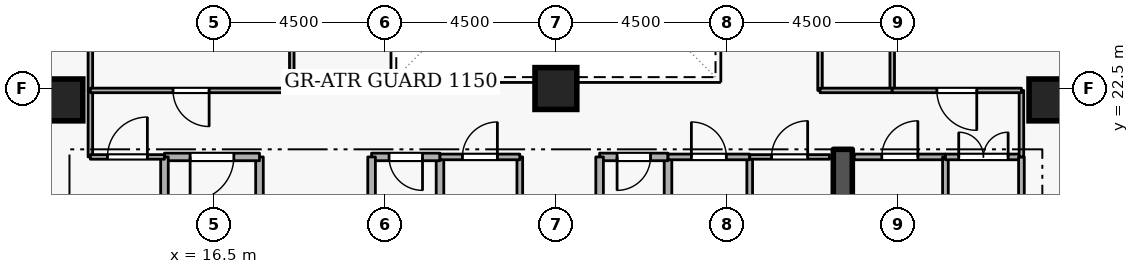
"""IFC4 building model, lengths in metres.
Left out: names, types, materials, properties, quantities, classifications, styles, units other than length and angle.
Written with IfcOpenShell. Run it as: python <this file> out.ifc"""

import sys

from ifc_helpers import new_model, si_unit, direction, frame, frame_2d, origin, origin_2d, place, context, subcontext, project, spatial, rectangle, extrude, element, fill, save


model = new_model("IFC4")
c1 = context("Model", 3, precision=1e-05, world=origin(), true_north=direction((0.0, 1.0)))
c2 = subcontext(c1, "Body", "Model", "MODEL_VIEW")
j1 = project(units=[si_unit("LENGTHUNIT", "METRE"), si_unit("PLANEANGLEUNIT", "RADIAN")], contexts=[c1])
p1 = place(None, origin())
s1 = spatial("IfcSite", under=j1, at=p1, CompositionType="ELEMENT")
p2 = place(p1, origin())
s2 = spatial("IfcBuilding", under=s1, at=p2, CompositionType="ELEMENT")
p3 = place(p2, frame((0.0, 0.0, 170.7)))
s3 = spatial("IfcBuildingStorey", under=s2, at=p3, CompositionType="ELEMENT", Elevation=170.7)
p4 = place(p3, frame((33.05, 15.1, 0.0), z_axis=(0.0, 0.0, 1.0), x_axis=(0.0, 1.0, 0.0)))
e1 = element("IfcWall", 1, at=p4, inside=s3, PredefinedType="SHEAR", context=c2, shape_type="SweptSolid", body=[
    extrude(rectangle(XDim=5.8, YDim=0.5, at=frame_2d((2.9, 0.0))), origin(), (0.0, 0.0, 1.0), 3.6),
])
for number, where, z_axis, x_axis in (
    (2, (12.5, 22.2, 0.0), (0.0, 0.0, 1.0), (1.0, 0.0, 0.0)),
    (3, (38.5, 22.2, 0.0), (0.0, 0.0, 1.0), (1.0, 0.0, 0.0)),
    (4, (25.5, 22.5, 0.0), (0.0, 0.0, 1.0), (1.0, 0.0, 0.0)),
):
    element("IfcColumn", number, at=place(p3, frame(where, z_axis=z_axis, x_axis=x_axis)), inside=s3, PredefinedType="COLUMN", context=c2, shape_type="SweptSolid", body=[
        extrude(rectangle(XDim=1.1, YDim=1.1, at=origin_2d()), origin(), (0.0, 0.0, 1.0), 3.6),
    ])
p5 = place(p3, frame((17.7, 18.4, 0.0), z_axis=(0.0, 0.0, 1.0), x_axis=(0.0, 1.0, 0.0)))
e5 = element("IfcWall", 5, at=p5, inside=s3, PredefinedType="STANDARD", context=c2, shape_type="SweptSolid", body=[
    extrude(rectangle(XDim=2.3, YDim=0.2, at=frame_2d((1.15, 0.0))), origin(), (0.0, 0.0, 1.0), 2.465),
])
p6 = place(p3, frame((17.7, 20.7, 0.0), z_axis=(0.0, 0.0, 1.0), x_axis=(-1.0, 0.0, 0.0)))
e6 = element("IfcWall", 6, at=p6, inside=s3, PredefinedType="STANDARD", context=c2, shape_type="SweptSolid", body=[
    extrude(rectangle(XDim=2.5, YDim=0.2, at=frame_2d((1.25, 0.0))), origin(), (0.0, 0.0, 1.0), 3.26),
])
p7 = place(p6, frame((0.675, 0.0, 0.0)))
e7 = element("IfcOpeningElement", 7, at=p7, cuts=e6, PredefinedType="OPENING", context=c2, shape_type="SweptSolid", body=[
    extrude(rectangle(XDim=1.15, YDim=2.1, at=frame_2d((0.575, 1.05))), frame((0.0, 0.11, 0.0), z_axis=(0.0, -1.0, 0.0), x_axis=(1.0, 0.0, 0.0)), (0.0, 0.0, 1.0), 0.22),
])
p8 = place(p3, frame((15.2, 20.7, 0.0), z_axis=(0.0, 0.0, 1.0), x_axis=(0.0, -1.0, 0.0)))
e8 = element("IfcWall", 8, at=p8, inside=s3, PredefinedType="STANDARD", context=c2, shape_type="SweptSolid", body=[
    extrude(rectangle(XDim=5.7, YDim=0.2, at=frame_2d((2.85, 0.0))), origin(), (0.0, 0.0, 1.0), 3.26),
])
p9 = place(p3, frame((28.45, 18.65, 0.0), z_axis=(0.0, 0.0, 1.0), x_axis=(0.0, 1.0, 0.0)))
e9 = element("IfcWall", 9, at=p9, inside=s3, PredefinedType="STANDARD", context=c2, shape_type="SweptSolid", body=[
    extrude(rectangle(XDim=2.05, YDim=0.2, at=frame_2d((1.025, 0.0))), origin(), (0.0, 0.0, 1.0), 3.26),
])
p10 = place(p3, frame((28.45, 20.7, 0.0), z_axis=(0.0, 0.0, 1.0), x_axis=(-1.0, 0.0, 0.0)))
e10 = element("IfcWall", 10, at=p10, inside=s3, PredefinedType="STANDARD", context=c2, shape_type="SweptSolid", body=[
    extrude(rectangle(XDim=1.8, YDim=0.2, at=frame_2d((0.9, 0.0))), origin(), (0.0, 0.0, 1.0), 3.26),
])
p11 = place(p10, frame((0.46, 0.0, 0.0)))
e11 = element("IfcOpeningElement", 11, at=p11, cuts=e10, PredefinedType="OPENING", context=c2, shape_type="SweptSolid", body=[
    extrude(rectangle(XDim=0.88, YDim=2.04, at=frame_2d((0.44, 1.02))), frame((0.0, 0.11, 0.0), z_axis=(0.0, -1.0, 0.0), x_axis=(1.0, 0.0, 0.0)), (0.0, 0.0, 1.0), 0.22),
])
for number, where, z_axis, x_axis in (
    (12, (26.65, 20.7, 0.0), (0.0, 0.0, 1.0), (0.0, -1.0, 0.0)),
    (13, (22.45, 18.65, 0.0), (0.0, 0.0, 1.0), (0.0, 1.0, 0.0)),
):
    element("IfcWall", number, at=place(p3, frame(where, z_axis=z_axis, x_axis=x_axis)), inside=s3, PredefinedType="STANDARD", context=c2, shape_type="SweptSolid", body=[
        extrude(rectangle(XDim=2.05, YDim=0.2, at=frame_2d((1.025, 0.0))), origin(), (0.0, 0.0, 1.0), 3.26),
    ])
p12 = place(p3, frame((22.45, 20.7, 0.0), z_axis=(0.0, 0.0, 1.0), x_axis=(-1.0, 0.0, 0.0)))
e14 = element("IfcWall", 14, at=p12, inside=s3, PredefinedType="STANDARD", context=c2, shape_type="SweptSolid", body=[
    extrude(rectangle(XDim=1.8, YDim=0.2, at=frame_2d((0.9, 0.0))), origin(), (0.0, 0.0, 1.0), 3.26),
])
p13 = place(p12, frame((0.46, 0.0, 0.0)))
e15 = element("IfcOpeningElement", 15, at=p13, cuts=e14, PredefinedType="OPENING", context=c2, shape_type="SweptSolid", body=[
    extrude(rectangle(XDim=0.88, YDim=2.04, at=frame_2d((0.44, 1.02))), frame((0.0, 0.11, 0.0), z_axis=(0.0, -1.0, 0.0), x_axis=(1.0, 0.0, 0.0)), (0.0, 0.0, 1.0), 0.22),
])
p14 = place(p3, frame((20.65, 20.7, 0.0), z_axis=(0.0, 0.0, 1.0), x_axis=(0.0, -1.0, 0.0)))
e16 = element("IfcWall", 16, at=p14, inside=s3, PredefinedType="STANDARD", context=c2, shape_type="SweptSolid", body=[
    extrude(rectangle(XDim=2.05, YDim=0.2, at=frame_2d((1.025, 0.0))), origin(), (0.0, 0.0, 1.0), 3.26),
])
p15 = place(p3, frame((24.55, 20.7, 0.0), z_axis=(0.0, 0.0, 1.0), x_axis=(0.0, -1.0, 0.0)))
e17 = element("IfcWall", 17, at=p15, inside=s3, PredefinedType="PARTITIONING", context=c2, shape_type="SweptSolid", body=[
    extrude(rectangle(XDim=2.05, YDim=0.15, at=frame_2d((1.025, 0.0))), origin(), (0.0, 0.0, 1.0), 3.26),
])
p16 = place(p3, frame((22.45, 20.7, 0.0), z_axis=(0.0, 0.0, 1.0), x_axis=(1.0, 0.0, 0.0)))
e18 = element("IfcWall", 18, at=p16, inside=s3, PredefinedType="PARTITIONING", context=c2, shape_type="SweptSolid", body=[
    extrude(rectangle(XDim=2.1, YDim=0.15, at=frame_2d((1.05, 0.0))), origin(), (0.0, 0.0, 1.0), 3.26),
])
p17 = place(p16, frame((0.59, 0.0, 0.0)))
e19 = element("IfcOpeningElement", 19, at=p17, cuts=e18, PredefinedType="OPENING", context=c2, shape_type="SweptSolid", body=[
    extrude(rectangle(XDim=0.92, YDim=2.08, at=frame_2d((0.46, 1.04))), frame((0.0, 0.085, 0.0), z_axis=(0.0, -1.0, 0.0), x_axis=(1.0, 0.0, 0.0)), (0.0, 0.0, 1.0), 0.17),
])
p18 = place(p3, frame((30.6, 20.7, 0.0), z_axis=(0.0, 0.0, 1.0), x_axis=(0.0, -1.0, 0.0)))
e20 = element("IfcWall", 20, at=p18, inside=s3, PredefinedType="PARTITIONING", context=c2, shape_type="SweptSolid", body=[
    extrude(rectangle(XDim=2.05, YDim=0.15, at=frame_2d((1.025, 0.0))), origin(), (0.0, 0.0, 1.0), 3.26),
])
p19 = place(p3, frame((28.45, 20.7, 0.0), z_axis=(0.0, 0.0, 1.0), x_axis=(1.0, 0.0, 0.0)))
e21 = element("IfcWall", 21, at=p19, inside=s3, PredefinedType="PARTITIONING", context=c2, shape_type="SweptSolid", body=[
    extrude(rectangle(XDim=2.15, YDim=0.15, at=frame_2d((1.075, 0.0))), origin(), (0.0, 0.0, 1.0), 3.26),
])
p20 = place(p19, frame((0.615, 0.0, 0.0)))
e22 = element("IfcOpeningElement", 22, at=p20, cuts=e21, PredefinedType="OPENING", context=c2, shape_type="SweptSolid", body=[
    extrude(rectangle(XDim=0.92, YDim=2.08, at=frame_2d((0.46, 1.04))), frame((0.0, 0.085, 0.0), z_axis=(0.0, -1.0, 0.0), x_axis=(1.0, 0.0, 0.0)), (0.0, 0.0, 1.0), 0.17),
])
p21 = place(p3, frame((30.6, 20.7, 0.0), z_axis=(0.0, 0.0, 1.0), x_axis=(1.0, 0.0, 0.0)))
e23 = element("IfcWall", 23, at=p21, inside=s3, PredefinedType="PARTITIONING", context=c2, shape_type="SweptSolid", body=[
    extrude(rectangle(XDim=2.1, YDim=0.12, at=frame_2d((1.05, 0.0))), origin(), (0.0, 0.0, 1.0), 3.26),
])
p22 = place(p21, frame((0.575, 0.0, 0.0)))
e24 = element("IfcOpeningElement", 24, at=p22, cuts=e23, PredefinedType="OPENING", context=c2, shape_type="SweptSolid", body=[
    extrude(rectangle(XDim=0.95, YDim=2.1, at=frame_2d((0.475, 1.05))), frame((0.0, 0.07, 0.0), z_axis=(0.0, -1.0, 0.0), x_axis=(1.0, 0.0, 0.0)), (0.0, 0.0, 1.0), 0.14),
])
p23 = place(p3, frame((33.35, 20.7, 0.0), z_axis=(0.0, 0.0, 1.0), x_axis=(1.0, 0.0, 0.0)))
e25 = element("IfcWall", 25, at=p23, inside=s3, PredefinedType="PARTITIONING", context=c2, shape_type="SweptSolid", body=[
    extrude(rectangle(XDim=2.4, YDim=0.15, at=frame_2d((1.2, 0.0))), origin(), (0.0, 0.0, 1.0), 3.26),
])
p24 = place(p23, frame((0.725, 0.0, 0.0)))
e26 = element("IfcOpeningElement", 26, at=p24, cuts=e25, PredefinedType="OPENING", context=c2, shape_type="SweptSolid", body=[
    extrude(rectangle(XDim=0.95, YDim=2.1, at=frame_2d((0.475, 1.05))), frame((0.0, 0.085, 0.0), z_axis=(0.0, -1.0, 0.0), x_axis=(1.0, 0.0, 0.0)), (0.0, 0.0, 1.0), 0.17),
])
p25 = place(p3, frame((35.75, 20.7, 0.0), z_axis=(0.0, 0.0, 1.0), x_axis=(0.0, -1.0, 0.0)))
e27 = element("IfcWall", 27, at=p25, inside=s3, PredefinedType="PARTITIONING", context=c2, shape_type="SweptSolid", body=[
    extrude(rectangle(XDim=5.65, YDim=0.15, at=frame_2d((2.825, 0.0))), origin(), (0.0, 0.0, 1.0), 3.26),
])
p26 = place(p3, frame((35.75, 20.7, 0.0), z_axis=(0.0, 0.0, 1.0), x_axis=(1.0, 0.0, 0.0)))
e28 = element("IfcWall", 28, at=p26, inside=s3, PredefinedType="PARTITIONING", context=c2, shape_type="SweptSolid", body=[
    extrude(rectangle(XDim=2.0, YDim=0.15, at=frame_2d((1.0, 0.0))), origin(), (0.0, 0.0, 1.0), 3.26),
])
p27 = place(p26, frame((0.35, 0.0, 0.0)))
e29 = element("IfcOpeningElement", 29, at=p27, cuts=e28, PredefinedType="OPENING", context=c2, shape_type="SweptSolid", body=[
    extrude(rectangle(XDim=1.3, YDim=2.12, at=frame_2d((0.65, 1.06))), frame((0.0, 0.085, 0.0), z_axis=(0.0, -1.0, 0.0), x_axis=(1.0, 0.0, 0.0)), (0.0, 0.0, 1.0), 0.17),
])
p28 = place(p3, frame((37.75, 20.7, 0.0), z_axis=(0.0, 0.0, 1.0), x_axis=(0.0, -1.0, 0.0)))
e30 = element("IfcWall", 30, at=p28, inside=s3, PredefinedType="PARTITIONING", context=c2, shape_type="SweptSolid", body=[
    extrude(rectangle(XDim=5.65, YDim=0.15, at=frame_2d((2.825, 0.0))), origin(), (0.0, 0.0, 1.0), 3.26),
])
p29 = place(p3, frame((13.25, 27.0, 0.0), z_axis=(0.0, 0.0, 1.0), x_axis=(0.0, -1.0, 0.0)))
e31 = element("IfcWall", 31, at=p29, inside=s3, PredefinedType="PARTITIONING", context=c2, shape_type="SweptSolid", body=[
    extrude(rectangle(XDim=4.55, YDim=0.12, at=frame_2d((2.275, 0.0))), origin(), (0.0, 0.0, 1.0), 3.26),
])
p30 = place(p3, frame((13.25, 22.45, 0.0), z_axis=(0.0, 0.0, 1.0), x_axis=(0.0, -1.0, 0.0)))
e32 = element("IfcWall", 32, at=p30, inside=s3, PredefinedType="PARTITIONING", context=c2, shape_type="SweptSolid", body=[
    extrude(rectangle(XDim=1.75, YDim=0.12, at=frame_2d((0.875, 0.0))), origin(), (0.0, 0.0, 1.0), 3.26),
])
p31 = place(p3, frame((13.25, 20.7, 0.0), z_axis=(0.0, 0.0, 1.0), x_axis=(1.0, 0.0, 0.0)))
e33 = element("IfcWall", 33, at=p31, inside=s3, PredefinedType="PARTITIONING", context=c2, shape_type="SweptSolid", body=[
    extrude(rectangle(XDim=1.95, YDim=0.12, at=frame_2d((0.975, 0.0))), origin(), (0.0, 0.0, 1.0), 3.26),
])
p32 = place(p31, frame((0.45, 0.0, 0.0)))
e34 = element("IfcOpeningElement", 34, at=p32, cuts=e33, PredefinedType="OPENING", context=c2, shape_type="SweptSolid", body=[
    extrude(rectangle(XDim=1.05, YDim=2.1, at=frame_2d((0.525, 1.05))), frame((0.0, 0.07, 0.0), z_axis=(0.0, -1.0, 0.0), x_axis=(1.0, 0.0, 0.0)), (0.0, 0.0, 1.0), 0.14),
])
p33 = place(p3, frame((18.55, 27.0, 0.0), z_axis=(0.0, 0.0, 1.0), x_axis=(0.0, -1.0, 0.0)))
e35 = element("IfcWall", 35, at=p33, inside=s3, PredefinedType="PARTITIONING", context=c2, shape_type="SweptSolid", body=[
    extrude(rectangle(XDim=4.55, YDim=0.12, at=frame_2d((2.275, 0.0))), origin(), (0.0, 0.0, 1.0), 3.26),
])
p34 = place(p3, frame((18.55, 22.45, 0.0), z_axis=(0.0, 0.0, 1.0), x_axis=(-1.0, 0.0, 0.0)))
e36 = element("IfcWall", 36, at=p34, inside=s3, PredefinedType="PARTITIONING", context=c2, shape_type="SweptSolid", body=[
    extrude(rectangle(XDim=5.3, YDim=0.12, at=frame_2d((2.65, 0.0))), origin(), (0.0, 0.0, 1.0), 3.26),
])
p35 = place(p34, frame((2.175, 0.0, 0.0)))
e37 = element("IfcOpeningElement", 37, at=p35, cuts=e36, PredefinedType="OPENING", context=c2, shape_type="SweptSolid", body=[
    extrude(rectangle(XDim=0.95, YDim=2.1, at=frame_2d((0.475, 1.05))), frame((0.0, 0.07, 0.0), z_axis=(0.0, -1.0, 0.0), x_axis=(1.0, 0.0, 0.0)), (0.0, 0.0, 1.0), 0.14),
])
p36 = place(p3, frame((32.45, 22.45, 0.0), z_axis=(0.0, 0.0, 1.0), x_axis=(0.0, 1.0, 0.0)))
e38 = element("IfcWall", 38, at=p36, inside=s3, PredefinedType="PARTITIONING", context=c2, shape_type="SweptSolid", body=[
    extrude(rectangle(XDim=4.55, YDim=0.12, at=frame_2d((2.275, 0.0))), origin(), (0.0, 0.0, 1.0), 3.26),
])
p37 = place(p36, frame((1.8, 0.0, 0.0)))
e39 = element("IfcOpeningElement", 39, at=p37, cuts=e38, PredefinedType="OPENING", context=c2, shape_type="SweptSolid", body=[
    extrude(rectangle(XDim=0.95, YDim=2.1, at=frame_2d((0.475, 1.05))), frame((0.0, 0.07, 0.0), z_axis=(0.0, -1.0, 0.0), x_axis=(1.0, 0.0, 0.0)), (0.0, 0.0, 1.0), 0.14),
])
p38 = place(p3, frame((34.35, 27.0, 0.0), z_axis=(0.0, 0.0, 1.0), x_axis=(0.0, -1.0, 0.0)))
e40 = element("IfcWall", 40, at=p38, inside=s3, PredefinedType="PARTITIONING", context=c2, shape_type="SweptSolid", body=[
    extrude(rectangle(XDim=4.55, YDim=0.12, at=frame_2d((2.275, 0.0))), origin(), (0.0, 0.0, 1.0), 3.26),
])
p39 = place(p3, frame((34.35, 22.45, 0.0), z_axis=(0.0, 0.0, 1.0), x_axis=(-1.0, 0.0, 0.0)))
e41 = element("IfcWall", 41, at=p39, inside=s3, PredefinedType="PARTITIONING", context=c2, shape_type="SweptSolid", body=[
    extrude(rectangle(XDim=1.9, YDim=0.12, at=frame_2d((0.95, 0.0))), origin(), (0.0, 0.0, 1.0), 3.26),
])
p40 = place(p3, frame((37.75, 20.7, 0.0), z_axis=(0.0, 0.0, 1.0), x_axis=(0.0, 1.0, 0.0)))
e42 = element("IfcWall", 42, at=p40, inside=s3, PredefinedType="PARTITIONING", context=c2, shape_type="SweptSolid", body=[
    extrude(rectangle(XDim=1.75, YDim=0.12, at=frame_2d((0.875, 0.0))), origin(), (0.0, 0.0, 1.0), 3.26),
])
p41 = place(p3, frame((37.75, 22.45, 0.0), z_axis=(0.0, 0.0, 1.0), x_axis=(-1.0, 0.0, 0.0)))
e43 = element("IfcWall", 43, at=p41, inside=s3, PredefinedType="PARTITIONING", context=c2, shape_type="SweptSolid", body=[
    extrude(rectangle(XDim=3.4, YDim=0.12, at=frame_2d((1.7, 0.0))), origin(), (0.0, 0.0, 1.0), 3.26),
])
p42 = place(p41, frame((1.175, 0.0, 0.0)))
e44 = element("IfcOpeningElement", 44, at=p42, cuts=e43, PredefinedType="OPENING", context=c2, shape_type="SweptSolid", body=[
    extrude(rectangle(XDim=1.05, YDim=2.1, at=frame_2d((0.525, 1.05))), frame((0.0, 0.07, 0.0), z_axis=(0.0, -1.0, 0.0), x_axis=(1.0, 0.0, 0.0)), (0.0, 0.0, 1.0), 0.14),
])
p43 = place(p7, origin())
e45 = element("IfcDoor", 45, at=p43, inside=s3, OperationType="SINGLE_SWING_RIGHT", PredefinedType="DOOR", context=c2, shape_type="SweptSolid", body=[
    extrude(rectangle(XDim=1.15, YDim=2.1, at=frame_2d((0.575, 1.05))), frame((0.0, 0.025, 0.0), z_axis=(0.0, -1.0, 0.0), x_axis=(1.0, 0.0, 0.0)), (0.0, 0.0, 1.0), 0.05),
])
fill(e7, e45)
p44 = place(p11, origin())
e46 = element("IfcDoor", 46, at=p44, inside=s3, OperationType="SINGLE_SWING_RIGHT", PredefinedType="DOOR", context=c2, shape_type="SweptSolid", body=[
    extrude(rectangle(XDim=0.88, YDim=2.04, at=frame_2d((0.44, 1.02))), frame((0.0, 0.025, 0.0), z_axis=(0.0, -1.0, 0.0), x_axis=(1.0, 0.0, 0.0)), (0.0, 0.0, 1.0), 0.05),
])
fill(e11, e46)
p45 = place(p13, origin())
e47 = element("IfcDoor", 47, at=p45, inside=s3, OperationType="SINGLE_SWING_LEFT", PredefinedType="DOOR", context=c2, shape_type="SweptSolid", body=[
    extrude(rectangle(XDim=0.88, YDim=2.04, at=frame_2d((0.44, 1.02))), frame((0.0, 0.025, 0.0), z_axis=(0.0, -1.0, 0.0), x_axis=(1.0, 0.0, 0.0)), (0.0, 0.0, 1.0), 0.05),
])
fill(e15, e47)
p46 = place(p17, origin())
e48 = element("IfcDoor", 48, at=p46, inside=s3, OperationType="SINGLE_SWING_RIGHT", PredefinedType="DOOR", context=c2, shape_type="SweptSolid", body=[
    extrude(rectangle(XDim=0.92, YDim=2.08, at=frame_2d((0.46, 1.04))), frame((0.0, 0.025, 0.0), z_axis=(0.0, -1.0, 0.0), x_axis=(1.0, 0.0, 0.0)), (0.0, 0.0, 1.0), 0.05),
])
fill(e19, e48)
p47 = place(p20, origin())
e49 = element("IfcDoor", 49, at=p47, inside=s3, OperationType="SINGLE_SWING_LEFT", PredefinedType="DOOR", context=c2, shape_type="SweptSolid", body=[
    extrude(rectangle(XDim=0.92, YDim=2.08, at=frame_2d((0.46, 1.04))), frame((0.0, 0.025, 0.0), z_axis=(0.0, -1.0, 0.0), x_axis=(1.0, 0.0, 0.0)), (0.0, 0.0, 1.0), 0.05),
])
fill(e22, e49)
p48 = place(p22, origin())
e50 = element("IfcDoor", 50, at=p48, inside=s3, OperationType="SINGLE_SWING_RIGHT", PredefinedType="DOOR", context=c2, shape_type="SweptSolid", body=[
    extrude(rectangle(XDim=0.95, YDim=2.1, at=frame_2d((0.475, 1.05))), frame((0.0, 0.025, 0.0), z_axis=(0.0, -1.0, 0.0), x_axis=(1.0, 0.0, 0.0)), (0.0, 0.0, 1.0), 0.05),
])
fill(e24, e50)
p49 = place(p24, origin())
e51 = element("IfcDoor", 51, at=p49, inside=s3, OperationType="SINGLE_SWING_RIGHT", PredefinedType="DOOR", context=c2, shape_type="SweptSolid", body=[
    extrude(rectangle(XDim=0.95, YDim=2.1, at=frame_2d((0.475, 1.05))), frame((0.0, 0.025, 0.0), z_axis=(0.0, -1.0, 0.0), x_axis=(1.0, 0.0, 0.0)), (0.0, 0.0, 1.0), 0.05),
])
fill(e26, e51)
p50 = place(p27, origin())
e52 = element("IfcDoor", 52, at=p50, inside=s3, OperationType="DOUBLE_DOOR_SINGLE_SWING", PredefinedType="DOOR", context=c2, shape_type="SweptSolid", body=[
    extrude(rectangle(XDim=1.3, YDim=2.12, at=frame_2d((0.65, 1.06))), frame((0.0, 0.025, 0.0), z_axis=(0.0, -1.0, 0.0), x_axis=(1.0, 0.0, 0.0)), (0.0, 0.0, 1.0), 0.05),
])
fill(e29, e52)
p51 = place(p32, origin())
e53 = element("IfcDoor", 53, at=p51, inside=s3, OperationType="SINGLE_SWING_RIGHT", PredefinedType="DOOR", context=c2, shape_type="SweptSolid", body=[
    extrude(rectangle(XDim=1.05, YDim=2.1, at=frame_2d((0.525, 1.05))), frame((0.0, 0.025, 0.0), z_axis=(0.0, -1.0, 0.0), x_axis=(1.0, 0.0, 0.0)), (0.0, 0.0, 1.0), 0.05),
])
fill(e34, e53)
p52 = place(p35, origin())
e54 = element("IfcDoor", 54, at=p52, inside=s3, OperationType="SINGLE_SWING_LEFT", PredefinedType="DOOR", context=c2, shape_type="SweptSolid", body=[
    extrude(rectangle(XDim=0.95, YDim=2.1, at=frame_2d((0.475, 1.05))), frame((0.0, 0.025, 0.0), z_axis=(0.0, -1.0, 0.0), x_axis=(1.0, 0.0, 0.0)), (0.0, 0.0, 1.0), 0.05),
])
fill(e37, e54)
p53 = place(p42, origin())
e55 = element("IfcDoor", 55, at=p53, inside=s3, OperationType="SINGLE_SWING_LEFT", PredefinedType="DOOR", context=c2, shape_type="SweptSolid", body=[
    extrude(rectangle(XDim=1.05, YDim=2.1, at=frame_2d((0.525, 1.05))), frame((0.0, 0.025, 0.0), z_axis=(0.0, -1.0, 0.0), x_axis=(1.0, 0.0, 0.0)), (0.0, 0.0, 1.0), 0.05),
])
fill(e44, e55)
save(model, sys.argv[1])
